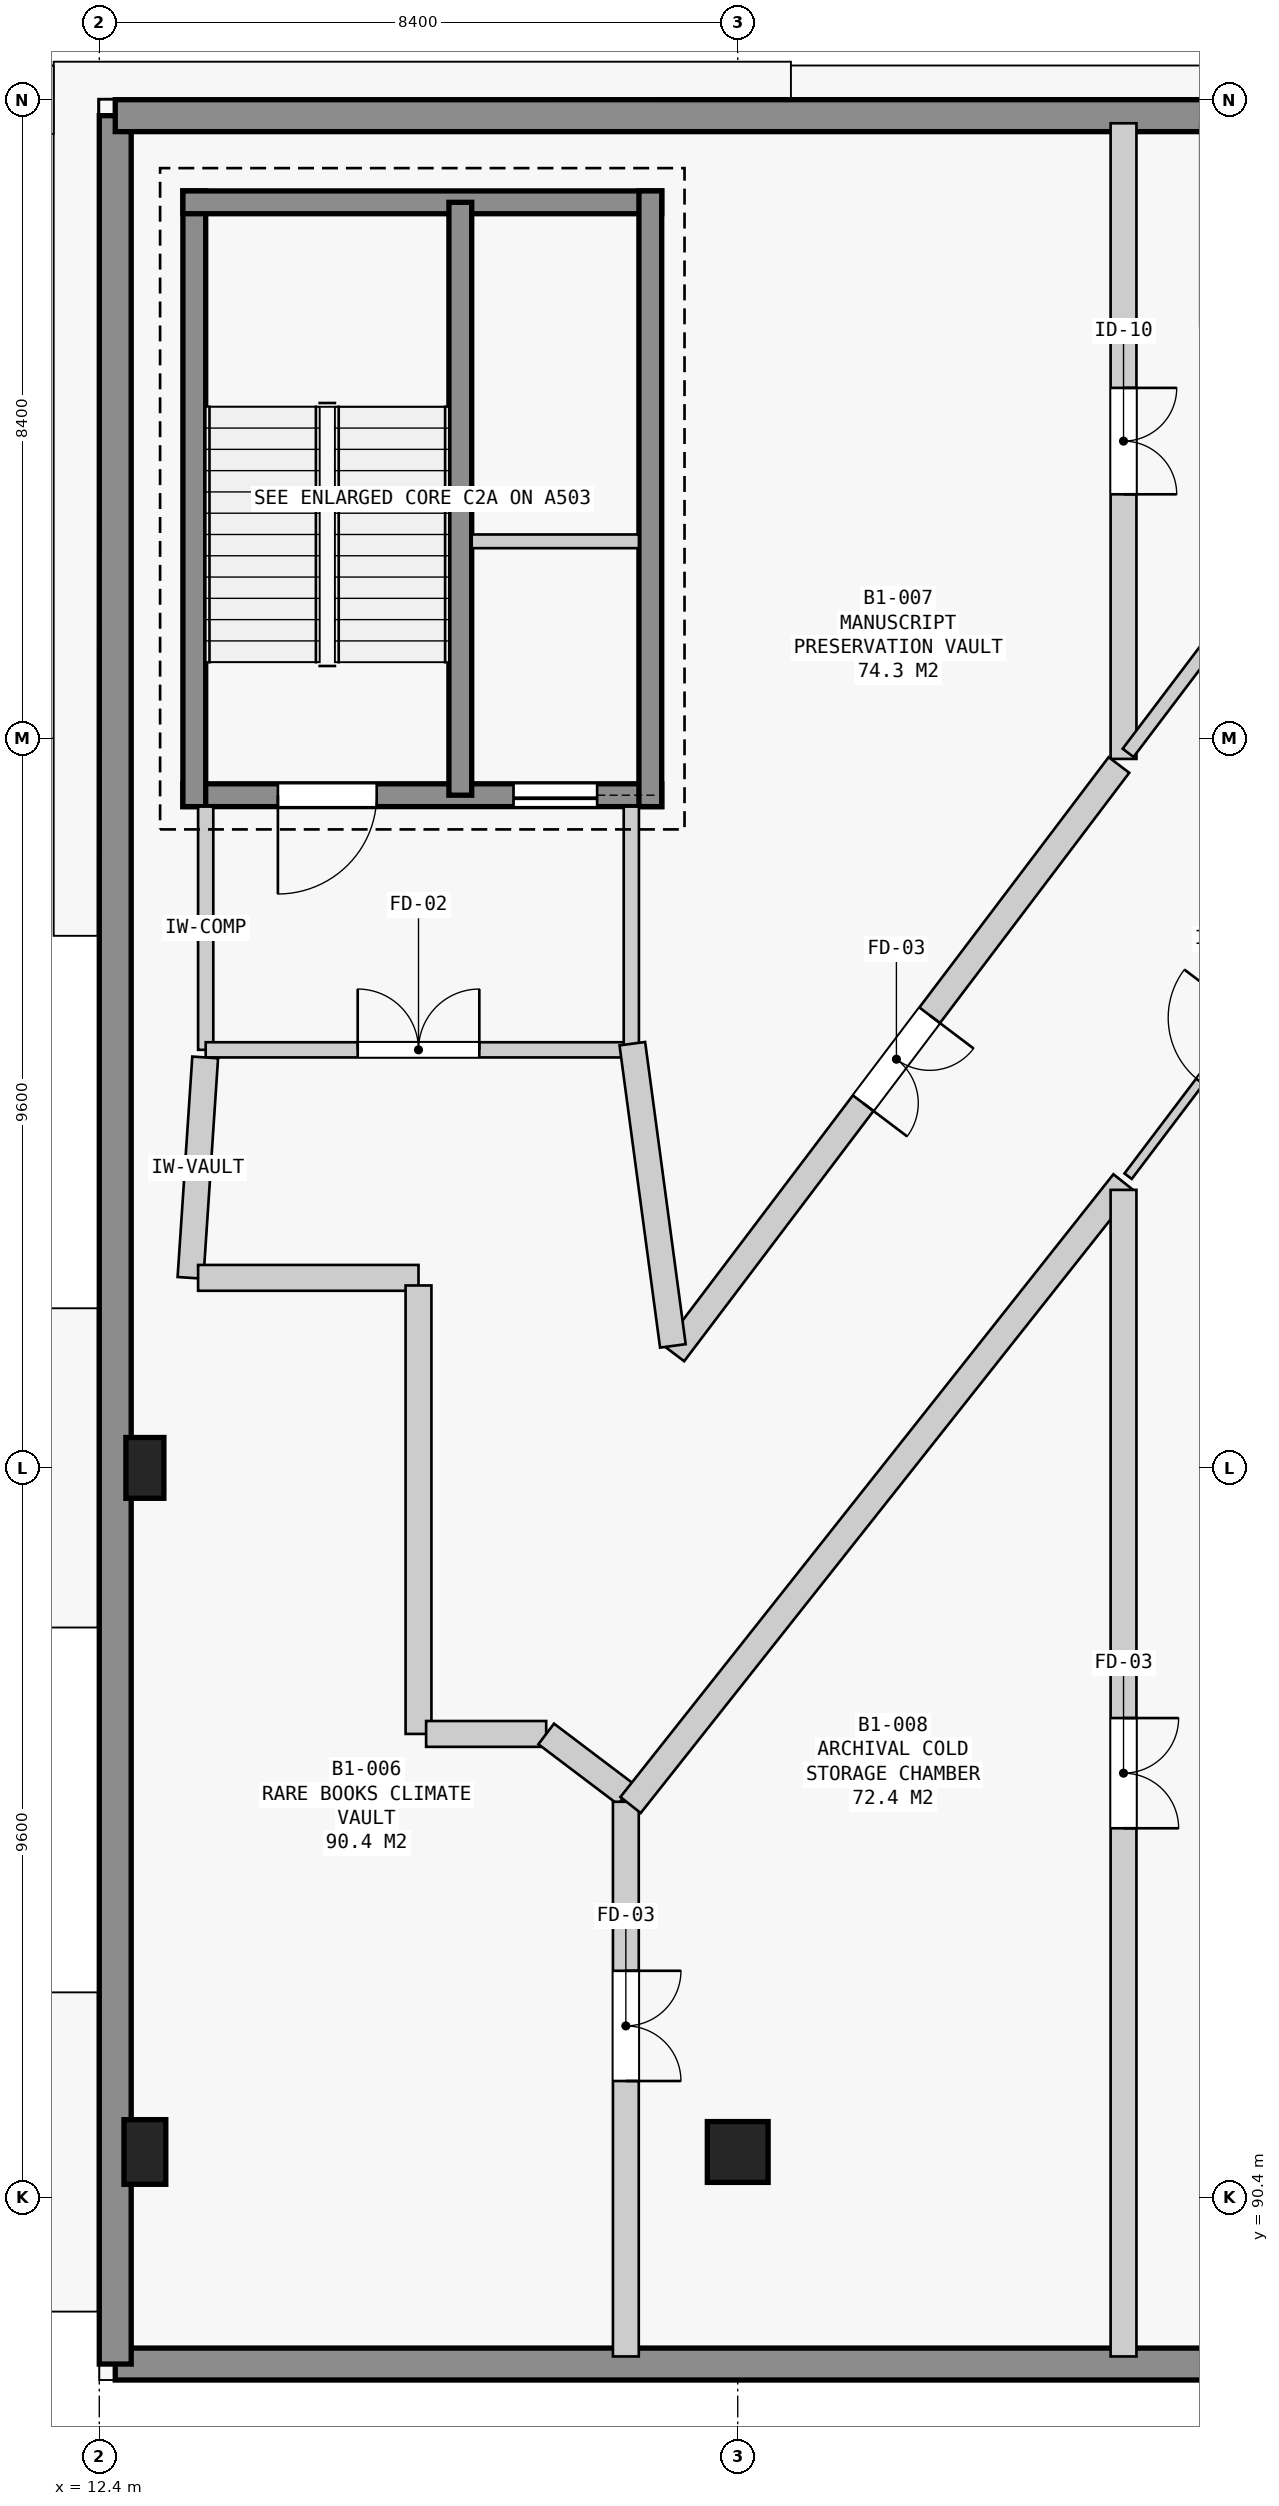
"""IFC4 building model, lengths in metres.
Left out: names, types, materials, properties, quantities, classifications, styles, units other than length and angle.
Written with IfcOpenShell. Run it as: python <this file> out.ifc"""

import sys

from ifc_helpers import new_model, si_unit, direction, frame, frame_2d, origin, origin_2d, place, context, subcontext, project, spatial, rectangle, extrude, element, fill, save


model = new_model("IFC4")
c1 = context("Model", 3, precision=1e-05, world=origin(), true_north=direction((0.0, 1.0)))
c2 = subcontext(c1, "Body", "Model", "MODEL_VIEW")
j1 = project(units=[si_unit("LENGTHUNIT", "METRE"), si_unit("PLANEANGLEUNIT", "RADIAN")], contexts=[c1])
p1 = place(None, origin())
s1 = spatial("IfcSite", under=j1, at=p1, CompositionType="ELEMENT")
p2 = place(p1, origin())
s2 = spatial("IfcBuilding", under=s1, at=p2, CompositionType="ELEMENT")
p3 = place(p2, frame((0.0, 0.0, -4.5)))
s3 = spatial("IfcBuildingStorey", under=s2, at=p3, CompositionType="ELEMENT", Elevation=-4.5)
p4 = place(p3, frame((13.0, 91.0, 0.0), z_axis=(0.0, 0.0, 1.0), x_axis=(1.0, 0.0, 0.0)))
e1 = element("IfcColumn", 1, at=p4, inside=s3, PredefinedType="COLUMN", context=c2, shape_type="SweptSolid", body=[
    extrude(rectangle(XDim=0.55, YDim=0.85, at=origin_2d()), origin(), (0.0, 0.0, 1.0), 4.5),
])
p5 = place(p3, frame((13.0, 100.0, 0.0), z_axis=(0.0, 0.0, 1.0), x_axis=(1.0, 0.0, 0.0)))
e2 = element("IfcColumn", 2, at=p5, inside=s3, PredefinedType="COLUMN", context=c2, shape_type="SweptSolid", body=[
    extrude(rectangle(XDim=0.5, YDim=0.8, at=origin_2d()), origin(), (0.0, 0.0, 1.0), 4.5),
])
p6 = place(p3, frame((20.8, 91.0, 0.0), z_axis=(0.0, 0.0, 1.0), x_axis=(1.0, 0.0, 0.0)))
e3 = element("IfcColumn", 3, at=p6, inside=s3, PredefinedType="COLUMN", context=c2, shape_type="SweptSolid", body=[
    extrude(rectangle(XDim=0.8, YDim=0.8, at=origin_2d()), origin(), (0.0, 0.0, 1.0), 4.5),
])
p7 = place(p3, frame((45.69, 88.21, 0.0), z_axis=(0.0, 0.0, 1.0), x_axis=(-1.0, 0.0, 0.0)))
e4 = element("IfcWall", 4, at=p7, inside=s3, PredefinedType="SOLIDWALL", context=c2, shape_type="SweptSolid", body=[
    extrude(rectangle(XDim=33.08, YDim=0.42, at=frame_2d((16.54, 0.0))), origin(), (0.0, 0.0, 1.0), 4.5),
])
p8 = place(p3, frame((12.61, 88.21, 0.0), z_axis=(0.0, 0.0, 1.0), x_axis=(0.0, 1.0, 0.0)))
e5 = element("IfcWall", 5, at=p8, inside=s3, PredefinedType="SOLIDWALL", context=c2, shape_type="SweptSolid", body=[
    extrude(rectangle(XDim=29.58, YDim=0.42, at=frame_2d((14.79, 0.0))), origin(), (0.0, 0.0, 1.0), 4.5),
])
p9 = place(p3, frame((12.61, 117.79, 0.0), z_axis=(0.0, 0.0, 1.0), x_axis=(1.0, 0.0, 0.0)))
e6 = element("IfcWall", 6, at=p9, inside=s3, PredefinedType="SOLIDWALL", context=c2, shape_type="SweptSolid", body=[
    extrude(rectangle(XDim=33.08, YDim=0.42, at=frame_2d((16.54, 0.0))), origin(), (0.0, 0.0, 1.0), 4.5),
])
p10 = place(p3, frame((19.8, 108.85, 0.0), z_axis=(0.0, 0.0, 1.0), x_axis=(-1.0, 0.0, 0.0)))
e7 = element("IfcWall", 7, at=p10, inside=s3, PredefinedType="SHEAR", context=c2, shape_type="SweptSolid", body=[
    extrude(rectangle(XDim=6.3, YDim=0.3, at=frame_2d((3.15, 0.0))), origin(), (0.0, 0.0, 1.0), 4.1),
])
p11 = place(p10, frame((3.75, 0.0, 0.0)))
e8 = element("IfcOpeningElement", 8, at=p11, cuts=e7, PredefinedType="OPENING", context=c2, shape_type="SweptSolid", body=[
    extrude(rectangle(XDim=1.3, YDim=2.2, at=frame_2d((0.65, 1.1))), frame((0.0, 0.16, 0.0), z_axis=(0.0, -1.0, 0.0), x_axis=(1.0, 0.0, 0.0)), (0.0, 0.0, 1.0), 0.32),
])
p12 = place(p10, frame((0.85, 0.0, 0.0)))
e9 = element("IfcOpeningElement", 9, at=p12, cuts=e7, PredefinedType="OPENING", context=c2, shape_type="SweptSolid", body=[
    extrude(rectangle(XDim=1.1, YDim=2.15, at=frame_2d((0.55, 1.075))), frame((0.0, 0.16, 0.0), z_axis=(0.0, -1.0, 0.0), x_axis=(1.0, 0.0, 0.0)), (0.0, 0.0, 1.0), 0.32),
])
p13 = place(p3, frame((13.65, 108.7, 0.0), z_axis=(0.0, 0.0, 1.0), x_axis=(0.0, 1.0, 0.0)))
e10 = element("IfcWall", 10, at=p13, inside=s3, PredefinedType="SHEAR", context=c2, shape_type="SweptSolid", body=[
    extrude(rectangle(XDim=8.1, YDim=0.3, at=frame_2d((4.05, 0.0))), origin(), (0.0, 0.0, 1.0), 4.1),
])
p14 = place(p3, frame((13.5, 116.65, 0.0), z_axis=(0.0, 0.0, 1.0), x_axis=(1.0, 0.0, 0.0)))
e11 = element("IfcWall", 11, at=p14, inside=s3, PredefinedType="SHEAR", context=c2, shape_type="SweptSolid", body=[
    extrude(rectangle(XDim=6.3, YDim=0.3, at=frame_2d((3.15, 0.0))), origin(), (0.0, 0.0, 1.0), 4.1),
])
p15 = place(p3, frame((19.65, 116.8, 0.0), z_axis=(0.0, 0.0, 1.0), x_axis=(0.0, -1.0, 0.0)))
e12 = element("IfcWall", 12, at=p15, inside=s3, PredefinedType="SHEAR", context=c2, shape_type="SweptSolid", body=[
    extrude(rectangle(XDim=8.1, YDim=0.3, at=frame_2d((4.05, 0.0))), origin(), (0.0, 0.0, 1.0), 4.1),
])
p16 = place(p3, frame((17.15, 108.85, 0.0), z_axis=(0.0, 0.0, 1.0), x_axis=(0.0, 1.0, 0.0)))
e13 = element("IfcWall", 13, at=p16, inside=s3, PredefinedType="SHEAR", context=c2, shape_type="SweptSolid", body=[
    extrude(rectangle(XDim=7.8, YDim=0.3, at=frame_2d((3.9, 0.0))), origin(), (0.0, 0.0, 1.0), 4.1),
])
p17 = place(p3, frame((17.3, 112.19, 0.0), z_axis=(0.0, 0.0, 1.0), x_axis=(1.0, 0.0, 0.0)))
e14 = element("IfcWall", 14, at=p17, inside=s3, PredefinedType="PARTITIONING", context=c2, shape_type="SweptSolid", body=[
    extrude(rectangle(XDim=2.2, YDim=0.18, at=frame_2d((1.1, 0.0))), origin(), (0.0, 0.0, 1.0), 4.1),
])
p18 = place(p3, frame((13.8, 108.7, 0.0), z_axis=(0.0, 0.0, 1.0), x_axis=(0.0, -1.0, 0.0)))
e15 = element("IfcWall", 15, at=p18, inside=s3, PredefinedType="STANDARD", context=c2, shape_type="SweptSolid", body=[
    extrude(rectangle(XDim=3.2, YDim=0.2, at=frame_2d((1.6, 0.0))), origin(), (0.0, 0.0, 1.0), 4.1),
])
p19 = place(p3, frame((13.8, 105.5, 0.0), z_axis=(0.0, 0.0, 1.0), x_axis=(1.0, 0.0, 0.0)))
e16 = element("IfcWall", 16, at=p19, inside=s3, PredefinedType="STANDARD", context=c2, shape_type="SweptSolid", body=[
    extrude(rectangle(XDim=5.6, YDim=0.2, at=frame_2d((2.8, 0.0))), origin(), (0.0, 0.0, 1.0), 4.1),
])
p20 = place(p19, frame((2.0, 0.0, 0.0)))
e17 = element("IfcOpeningElement", 17, at=p20, cuts=e16, PredefinedType="OPENING", context=c2, shape_type="SweptSolid", body=[
    extrude(rectangle(XDim=1.6, YDim=2.2, at=frame_2d((0.8, 1.1))), frame((0.0, 0.11, 0.0), z_axis=(0.0, -1.0, 0.0), x_axis=(1.0, 0.0, 0.0)), (0.0, 0.0, 1.0), 0.22),
])
p21 = place(p3, frame((19.4, 105.5, 0.0), z_axis=(0.0, 0.0, 1.0), x_axis=(0.0, 1.0, 0.0)))
e18 = element("IfcWall", 18, at=p21, inside=s3, PredefinedType="STANDARD", context=c2, shape_type="SweptSolid", body=[
    extrude(rectangle(XDim=3.2, YDim=0.2, at=frame_2d((1.6, 0.0))), origin(), (0.0, 0.0, 1.0), 4.1),
])
p22 = place(p3, frame((13.793, 105.4, 0.0), z_axis=(0.0, 0.0, 1.0), x_axis=(-0.066440960793, -0.997790358106, 0.0)))
e19 = element("IfcWall", 19, at=p22, inside=s3, PredefinedType="STANDARD", context=c2, shape_type="SweptSolid", body=[
    extrude(rectangle(XDim=2.906, YDim=0.34, at=frame_2d((1.453, 0.0))), origin(), (0.0, 0.0, 1.0), 4.1),
])
p23 = place(p3, frame((13.7, 102.5, 0.0), z_axis=(0.0, 0.0, 1.0), x_axis=(1.0, 0.0, 0.0)))
e20 = element("IfcWall", 20, at=p23, inside=s3, PredefinedType="STANDARD", context=c2, shape_type="SweptSolid", body=[
    extrude(rectangle(XDim=2.9, YDim=0.34, at=frame_2d((1.45, 0.0))), origin(), (0.0, 0.0, 1.0), 4.1),
])
p24 = place(p3, frame((16.6, 102.4, 0.0), z_axis=(0.0, 0.0, 1.0), x_axis=(0.0, -1.0, 0.0)))
e21 = element("IfcWall", 21, at=p24, inside=s3, PredefinedType="STANDARD", context=c2, shape_type="SweptSolid", body=[
    extrude(rectangle(XDim=5.9, YDim=0.34, at=frame_2d((2.95, 0.0))), origin(), (0.0, 0.0, 1.0), 3.23),
])
p25 = place(p3, frame((16.7, 96.5, 0.0), z_axis=(0.0, 0.0, 1.0), x_axis=(1.0, 0.0, 0.0)))
e22 = element("IfcWall", 22, at=p25, inside=s3, PredefinedType="STANDARD", context=c2, shape_type="SweptSolid", body=[
    extrude(rectangle(XDim=1.58, YDim=0.34, at=frame_2d((0.79, 0.0))), origin(), (0.0, 0.0, 1.0), 4.1),
])
p26 = place(p3, frame((18.28, 96.5, 0.0), z_axis=(0.0, 0.0, 1.0), x_axis=(0.797495786503, -0.603324515092, 0.0)))
e23 = element("IfcWall", 23, at=p26, inside=s3, PredefinedType="STANDARD", context=c2, shape_type="SweptSolid", body=[
    extrude(rectangle(XDim=1.314, YDim=0.34, at=frame_2d((0.657, 0.0))), origin(), (0.0, 0.0, 1.0), 4.1),
])
p27 = place(p3, frame((19.328, 95.607, 0.0), z_axis=(0.0, 0.0, 1.0), x_axis=(0.0, -1.0, 0.0)))
e24 = element("IfcWall", 24, at=p27, inside=s3, PredefinedType="STANDARD", context=c2, shape_type="SweptSolid", body=[
    extrude(rectangle(XDim=7.297, YDim=0.34, at=frame_2d((3.649, 0.0))), origin(), (0.0, 0.0, 1.0), 3.38),
])
p28 = place(p27, frame((2.224, 0.0, 0.0)))
e25 = element("IfcOpeningElement", 25, at=p28, cuts=e24, PredefinedType="OPENING", context=c2, shape_type="SweptSolid", body=[
    extrude(rectangle(XDim=1.45, YDim=2.2, at=frame_2d((0.725, 1.1))), frame((0.0, 0.18, 0.0), z_axis=(0.0, -1.0, 0.0), x_axis=(1.0, 0.0, 0.0)), (0.0, 0.0, 1.0), 0.36),
])
p29 = place(p3, frame((25.876, 117.69, 0.0), z_axis=(0.0, 0.0, 1.0), x_axis=(0.0, -1.0, 0.0)))
e26 = element("IfcWall", 26, at=p29, inside=s3, PredefinedType="STANDARD", context=c2, shape_type="SweptSolid", body=[
    extrude(rectangle(XDim=8.363, YDim=0.34, at=frame_2d((4.181, 0.0))), origin(), (0.0, 0.0, 1.0), 4.1),
])
p30 = place(p29, frame((3.481, 0.0, 0.0)))
e27 = element("IfcOpeningElement", 27, at=p30, cuts=e26, PredefinedType="OPENING", context=c2, shape_type="SweptSolid", body=[
    extrude(rectangle(XDim=1.4, YDim=2.2, at=frame_2d((0.7, 1.1))), frame((0.0, 0.18, 0.0), z_axis=(0.0, -1.0, 0.0), x_axis=(1.0, 0.0, 0.0)), (0.0, 0.0, 1.0), 0.36),
])
p31 = place(p3, frame((25.816, 109.248, 0.0), z_axis=(0.0, 0.0, 1.0), x_axis=(-0.60326673285, -0.79753949685, 0.0)))
e28 = element("IfcWall", 28, at=p31, inside=s3, PredefinedType="STANDARD", context=c2, shape_type="SweptSolid", body=[
    extrude(rectangle(XDim=9.707, YDim=0.34, at=frame_2d((4.854, 0.0))), origin(), (0.0, 0.0, 1.0), 4.1),
])
p32 = place(p31, frame((4.128, 0.0, 0.0)))
e29 = element("IfcOpeningElement", 29, at=p32, cuts=e28, PredefinedType="OPENING", context=c2, shape_type="SweptSolid", body=[
    extrude(rectangle(XDim=1.45, YDim=2.2, at=frame_2d((0.725, 1.1))), frame((0.0, 0.18, 0.0), z_axis=(0.0, -1.0, 0.0), x_axis=(1.0, 0.0, 0.0)), (0.0, 0.0, 1.0), 0.36),
])
p33 = place(p3, frame((19.947, 101.605, 0.0), z_axis=(0.0, 0.0, 1.0), x_axis=(-0.132980911194, 0.991118598987, 0.0)))
e30 = element("IfcWall", 30, at=p33, inside=s3, PredefinedType="STANDARD", context=c2, shape_type="SweptSolid", body=[
    extrude(rectangle(XDim=4.011, YDim=0.34, at=frame_2d((2.006, 0.0))), origin(), (0.0, 0.0, 1.0), 4.1),
])
p34 = place(p3, frame((19.39, 95.565, 0.0), z_axis=(0.0, 0.0, 1.0), x_axis=(0.620703542818, 0.784045350687, 0.0)))
e31 = element("IfcWall", 31, at=p34, inside=s3, PredefinedType="STANDARD", context=c2, shape_type="SweptSolid", body=[
    extrude(rectangle(XDim=10.449, YDim=0.34, at=frame_2d((5.225, 0.0))), origin(), (0.0, 0.0, 1.0), 3.23),
])
p35 = place(p3, frame((25.876, 103.658, 0.0), z_axis=(0.0, 0.0, 1.0), x_axis=(0.0, -1.0, 0.0)))
e32 = element("IfcWall", 32, at=p35, inside=s3, PredefinedType="STANDARD", context=c2, shape_type="SweptSolid", body=[
    extrude(rectangle(XDim=15.348, YDim=0.34, at=frame_2d((7.674, 0.0))), origin(), (0.0, 0.0, 1.0), 3.23),
])
p36 = place(p35, frame((6.949, 0.0, 0.0)))
e33 = element("IfcOpeningElement", 33, at=p36, cuts=e32, PredefinedType="OPENING", context=c2, shape_type="SweptSolid", body=[
    extrude(rectangle(XDim=1.45, YDim=2.2, at=frame_2d((0.725, 1.1))), frame((0.0, 0.18, 0.0), z_axis=(0.0, -1.0, 0.0), x_axis=(1.0, 0.0, 0.0)), (0.0, 0.0, 1.0), 0.36),
])
p37 = place(p3, frame((25.936, 103.837, 0.0), z_axis=(0.0, 0.0, 1.0), x_axis=(0.603275989972, 0.797532494588, 0.0)))
e34 = element("IfcWall", 34, at=p37, inside=s3, PredefinedType="PARTITIONING", context=c2, shape_type="SweptSolid", body=[
    extrude(rectangle(XDim=4.179, YDim=0.12, at=frame_2d((2.089, 0.0))), origin(), (0.0, 0.0, 1.0), 4.1),
])
p38 = place(p37, frame((1.564, 0.0, 0.0)))
e35 = element("IfcOpeningElement", 35, at=p38, cuts=e34, PredefinedType="OPENING", context=c2, shape_type="SweptSolid", body=[
    extrude(rectangle(XDim=1.05, YDim=2.15, at=frame_2d((0.525, 1.075))), frame((0.0, 0.07, 0.0), z_axis=(0.0, -1.0, 0.0), x_axis=(1.0, 0.0, 0.0)), (0.0, 0.0, 1.0), 0.14),
])
p39 = place(p3, frame((27.0, 110.813, 0.0), z_axis=(0.0, 0.0, 1.0), x_axis=(-0.603273712598, -0.797534217252, 0.0)))
e36 = element("IfcWall", 36, at=p39, inside=s3, PredefinedType="PARTITIONING", context=c2, shape_type="SweptSolid", body=[
    extrude(rectangle(XDim=1.763, YDim=0.18, at=frame_2d((0.882, 0.0))), origin(), (0.0, 0.0, 1.0), 4.1),
])
p40 = place(p11, origin())
e37 = element("IfcDoor", 37, at=p40, inside=s3, OperationType="SINGLE_SWING_RIGHT", PredefinedType="DOOR", context=c2, shape_type="SweptSolid", body=[
    extrude(rectangle(XDim=1.3, YDim=2.2, at=frame_2d((0.65, 1.1))), frame((0.0, 0.025, 0.0), z_axis=(0.0, -1.0, 0.0), x_axis=(1.0, 0.0, 0.0)), (0.0, 0.0, 1.0), 0.05),
])
fill(e8, e37)
p41 = place(p12, origin())
e38 = element("IfcDoor", 38, at=p41, inside=s3, OperationType="SLIDING_TO_LEFT", PredefinedType="DOOR", context=c2, shape_type="SweptSolid", body=[
    extrude(rectangle(XDim=1.1, YDim=2.15, at=frame_2d((0.55, 1.075))), frame((0.0, 0.025, 0.0), z_axis=(0.0, -1.0, 0.0), x_axis=(1.0, 0.0, 0.0)), (0.0, 0.0, 1.0), 0.05),
])
fill(e9, e38)
p42 = place(p20, origin())
e39 = element("IfcDoor", 39, at=p42, inside=s3, OperationType="DOUBLE_DOOR_SINGLE_SWING", PredefinedType="DOOR", context=c2, shape_type="SweptSolid", body=[
    extrude(rectangle(XDim=1.6, YDim=2.2, at=frame_2d((0.8, 1.1))), frame((0.0, 0.025, 0.0), z_axis=(0.0, -1.0, 0.0), x_axis=(1.0, 0.0, 0.0)), (0.0, 0.0, 1.0), 0.05),
])
fill(e17, e39)
p43 = place(p28, origin())
e40 = element("IfcDoor", 40, at=p43, inside=s3, OperationType="DOUBLE_DOOR_SINGLE_SWING", PredefinedType="DOOR", context=c2, shape_type="SweptSolid", body=[
    extrude(rectangle(XDim=1.45, YDim=2.2, at=frame_2d((0.725, 1.1))), frame((0.0, 0.025, 0.0), z_axis=(0.0, -1.0, 0.0), x_axis=(1.0, 0.0, 0.0)), (0.0, 0.0, 1.0), 0.05),
])
fill(e25, e40)
p44 = place(p32, origin())
e41 = element("IfcDoor", 41, at=p44, inside=s3, OperationType="DOUBLE_DOOR_SINGLE_SWING", PredefinedType="DOOR", context=c2, shape_type="SweptSolid", body=[
    extrude(rectangle(XDim=1.45, YDim=2.2, at=frame_2d((0.725, 1.1))), frame((0.0, 0.025, 0.0), z_axis=(0.0, -1.0, 0.0), x_axis=(1.0, 0.0, 0.0)), (0.0, 0.0, 1.0), 0.05),
])
fill(e29, e41)
p45 = place(p36, origin())
e42 = element("IfcDoor", 42, at=p45, inside=s3, OperationType="DOUBLE_DOOR_SINGLE_SWING", PredefinedType="DOOR", context=c2, shape_type="SweptSolid", body=[
    extrude(rectangle(XDim=1.45, YDim=2.2, at=frame_2d((0.725, 1.1))), frame((0.0, 0.025, 0.0), z_axis=(0.0, -1.0, 0.0), x_axis=(1.0, 0.0, 0.0)), (0.0, 0.0, 1.0), 0.05),
])
fill(e33, e42)
p46 = place(p38, origin())
e43 = element("IfcDoor", 43, at=p46, inside=s3, OperationType="SINGLE_SWING_RIGHT", PredefinedType="DOOR", context=c2, shape_type="SweptSolid", body=[
    extrude(rectangle(XDim=1.05, YDim=2.15, at=frame_2d((0.525, 1.075))), frame((0.0, 0.025, 0.0), z_axis=(0.0, -1.0, 0.0), x_axis=(1.0, 0.0, 0.0)), (0.0, 0.0, 1.0), 0.05),
])
fill(e35, e43)
p47 = place(p30, origin())
e44 = element("IfcDoor", 44, at=p47, inside=s3, OperationType="DOUBLE_DOOR_SINGLE_SWING", PredefinedType="DOOR", context=c2, shape_type="SweptSolid", body=[
    extrude(rectangle(XDim=1.4, YDim=2.2, at=frame_2d((0.7, 1.1))), frame((0.0, 0.025, 0.0), z_axis=(0.0, -1.0, 0.0), x_axis=(1.0, 0.0, 0.0)), (0.0, 0.0, 1.0), 0.05),
])
fill(e27, e44)
save(model, sys.argv[1])
